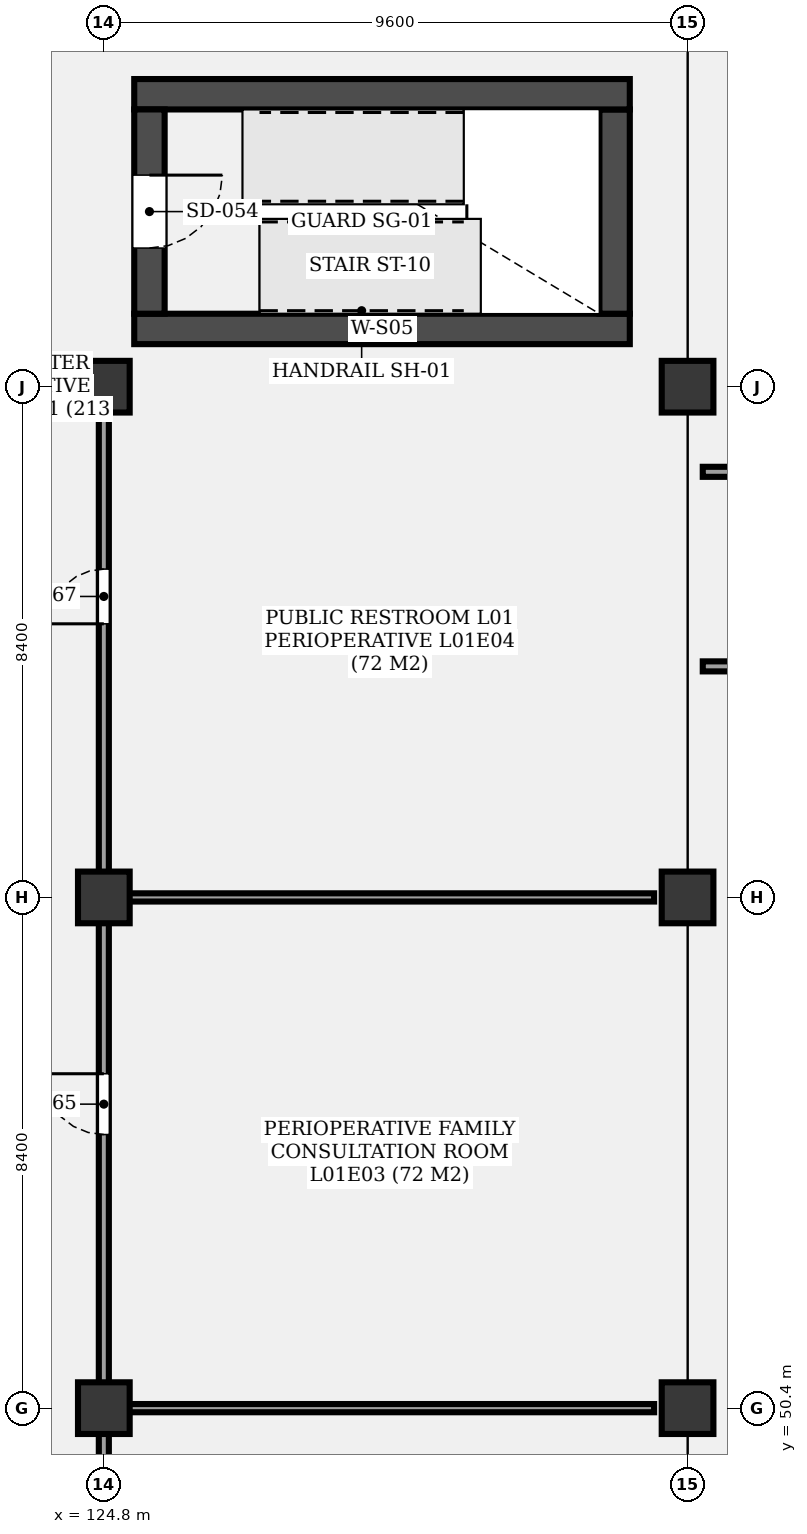
"""IFC4 building model, lengths in metres.
Left out: names, types, materials, properties, quantities, classifications, styles, units other than length and angle.
Written with IfcOpenShell. Run it as: python <this file> out.ifc"""

import sys

from ifc_helpers import new_model, si_unit, direction, frame, frame_2d, origin, origin_2d, place, context, subcontext, project, spatial, rectangle, extrude, element, fill, save


model = new_model("IFC4")
c1 = context("Model", 3, precision=1e-05, world=origin(), true_north=direction((0.0, 1.0)))
c2 = subcontext(c1, "Body", "Model", "MODEL_VIEW")
j1 = project(units=[si_unit("LENGTHUNIT", "METRE"), si_unit("PLANEANGLEUNIT", "RADIAN")], contexts=[c1])
p1 = place(None, origin())
s1 = spatial("IfcSite", under=j1, at=p1, CompositionType="ELEMENT")
p2 = place(p1, origin())
s2 = spatial("IfcBuilding", under=s1, at=p2, CompositionType="ELEMENT")
p3 = place(p2, frame((0.0, 0.0, 5.1)))
s3 = spatial("IfcBuildingStorey", under=s2, at=p3, CompositionType="ELEMENT", Elevation=5.1)
for number, where, z_axis, x_axis in (
    (1, (124.8, 50.4, 0.0), (0.0, 0.0, 1.0), (1.0, 0.0, 0.0)),
    (2, (124.8, 58.8, 0.0), (0.0, 0.0, 1.0), (1.0, 0.0, 0.0)),
    (3, (124.8, 67.2, 0.0), (0.0, 0.0, 1.0), (1.0, 0.0, 0.0)),
    (4, (134.4, 50.4, 0.0), (0.0, 0.0, 1.0), (1.0, 0.0, 0.0)),
    (5, (134.4, 58.8, 0.0), (0.0, 0.0, 1.0), (1.0, 0.0, 0.0)),
    (6, (134.4, 67.2, 0.0), (0.0, 0.0, 1.0), (1.0, 0.0, 0.0)),
):
    element("IfcColumn", number, at=place(p3, frame(where, z_axis=z_axis, x_axis=x_axis)), inside=s3, PredefinedType="COLUMN", context=c2, shape_type="SweptSolid", body=[
        extrude(rectangle(XDim=0.85, YDim=0.85, at=origin_2d()), origin(), (0.0, 0.0, 1.0), 4.8),
    ])
p4 = place(p3, frame((125.3, 68.15, 0.0), z_axis=(0.0, 0.0, 1.0), x_axis=(1.0, 0.0, 0.0)))
e7 = element("IfcWall", 7, at=p4, inside=s3, PredefinedType="SHEAR", context=c2, shape_type="SweptSolid", body=[
    extrude(rectangle(XDim=8.15, YDim=0.5, at=frame_2d((4.075, 0.0))), origin(), (0.0, 0.0, 1.0), 4.8),
])
p5 = place(p3, frame((133.2, 68.4, 0.0), z_axis=(0.0, 0.0, 1.0), x_axis=(0.0, 1.0, 0.0)))
e8 = element("IfcWall", 8, at=p5, inside=s3, PredefinedType="SHEAR", context=c2, shape_type="SweptSolid", body=[
    extrude(rectangle(XDim=3.36, YDim=0.5, at=frame_2d((1.68, 0.0))), origin(), (0.0, 0.0, 1.0), 4.8),
])
p6 = place(p3, frame((133.45, 72.01, 0.0), z_axis=(0.0, 0.0, 1.0), x_axis=(-1.0, 0.0, 0.0)))
e9 = element("IfcWall", 9, at=p6, inside=s3, PredefinedType="SHEAR", context=c2, shape_type="SweptSolid", body=[
    extrude(rectangle(XDim=8.15, YDim=0.5, at=frame_2d((4.075, 0.0))), origin(), (0.0, 0.0, 1.0), 4.8),
])
p7 = place(p3, frame((125.55, 71.76, 0.0), z_axis=(0.0, 0.0, 1.0), x_axis=(0.0, -1.0, 0.0)))
e10 = element("IfcWall", 10, at=p7, inside=s3, PredefinedType="SHEAR", context=c2, shape_type="SweptSolid", body=[
    extrude(rectangle(XDim=3.36, YDim=0.5, at=frame_2d((1.68, 0.0))), origin(), (0.0, 0.0, 1.0), 4.8),
])
p8 = place(p7, frame((1.08, 0.0, 0.0)))
e11 = element("IfcOpeningElement", 11, at=p8, cuts=e10, PredefinedType="OPENING", context=c2, shape_type="SweptSolid", body=[
    extrude(rectangle(XDim=1.2, YDim=2.2, at=frame_2d((0.6, 1.1))), frame((0.0, 0.26, 0.0), z_axis=(0.0, -1.0, 0.0), x_axis=(1.0, 0.0, 0.0)), (0.0, 0.0, 1.0), 0.52),
])
p9 = place(p3, frame((124.8, 42.25, 0.0), z_axis=(0.0, 0.0, 1.0), x_axis=(0.0, 1.0, 0.0)))
e12 = element("IfcWall", 12, at=p9, inside=s3, PredefinedType="PARTITIONING", context=c2, shape_type="SweptSolid", body=[
    extrude(rectangle(XDim=7.9, YDim=0.165, at=frame_2d((3.95, 0.0))), origin(), (0.0, 0.0, 1.0), 3.68),
])
p10 = place(p9, frame((4.25, 0.0, 0.0)))
e13 = element("IfcOpeningElement", 13, at=p10, cuts=e12, PredefinedType="OPENING", context=c2, shape_type="SweptSolid", body=[
    extrude(rectangle(XDim=0.9, YDim=2.1, at=frame_2d((0.45, 1.05))), frame((0.0, 0.093, 0.0), z_axis=(0.0, -1.0, 0.0), x_axis=(1.0, 0.0, 0.0)), (0.0, 0.0, 1.0), 0.185),
])
p11 = place(p3, frame((124.8, 50.65, 0.0), z_axis=(0.0, 0.0, 1.0), x_axis=(0.0, 1.0, 0.0)))
e14 = element("IfcWall", 14, at=p11, inside=s3, PredefinedType="PARTITIONING", context=c2, shape_type="SweptSolid", body=[
    extrude(rectangle(XDim=7.9, YDim=0.165, at=frame_2d((3.95, 0.0))), origin(), (0.0, 0.0, 1.0), 3.68),
])
p12 = place(p11, frame((4.25, 0.0, 0.0)))
e15 = element("IfcOpeningElement", 15, at=p12, cuts=e14, PredefinedType="OPENING", context=c2, shape_type="SweptSolid", body=[
    extrude(rectangle(XDim=1.0, YDim=2.2, at=frame_2d((0.5, 1.1))), frame((0.0, 0.093, 0.0), z_axis=(0.0, -1.0, 0.0), x_axis=(1.0, 0.0, 0.0)), (0.0, 0.0, 1.0), 0.185),
])
p13 = place(p3, frame((124.95, 50.4, 0.0), z_axis=(0.0, 0.0, 1.0), x_axis=(1.0, 0.0, 0.0)))
e16 = element("IfcWall", 16, at=p13, inside=s3, PredefinedType="PARTITIONING", context=c2, shape_type="SweptSolid", body=[
    extrude(rectangle(XDim=8.9, YDim=0.135, at=frame_2d((4.45, 0.0))), origin(), (0.0, 0.0, 1.0), 3.68),
])
p14 = place(p3, frame((124.8, 59.05, 0.0), z_axis=(0.0, 0.0, 1.0), x_axis=(0.0, 1.0, 0.0)))
e17 = element("IfcWall", 17, at=p14, inside=s3, PredefinedType="PARTITIONING", context=c2, shape_type="SweptSolid", body=[
    extrude(rectangle(XDim=7.9, YDim=0.165, at=frame_2d((3.95, 0.0))), origin(), (0.0, 0.0, 1.0), 3.68),
])
p15 = place(p14, frame((4.25, 0.0, 0.0)))
e18 = element("IfcOpeningElement", 18, at=p15, cuts=e17, PredefinedType="OPENING", context=c2, shape_type="SweptSolid", body=[
    extrude(rectangle(XDim=0.9, YDim=2.1, at=frame_2d((0.45, 1.05))), frame((0.0, 0.093, 0.0), z_axis=(0.0, -1.0, 0.0), x_axis=(1.0, 0.0, 0.0)), (0.0, 0.0, 1.0), 0.185),
])
p16 = place(p3, frame((124.95, 58.8, 0.0), z_axis=(0.0, 0.0, 1.0), x_axis=(1.0, 0.0, 0.0)))
e19 = element("IfcWall", 19, at=p16, inside=s3, PredefinedType="PARTITIONING", context=c2, shape_type="SweptSolid", body=[
    extrude(rectangle(XDim=8.9, YDim=0.135, at=frame_2d((4.45, 0.0))), origin(), (0.0, 0.0, 1.0), 3.68),
])
p17 = place(p3, frame((134.65, 62.6, 0.0), z_axis=(0.0, 0.0, 1.0), x_axis=(1.0, 0.0, 0.0)))
e20 = element("IfcWall", 20, at=p17, inside=s3, PredefinedType="PARTITIONING", context=c2, shape_type="SweptSolid", body=[
    extrude(rectangle(XDim=9.633, YDim=0.165, at=frame_2d((4.816, 0.0))), origin(), (0.0, 0.0, 1.0), 3.68),
])
p18 = place(p17, frame((2.65, 0.0, 0.0)))
e21 = element("IfcOpeningElement", 21, at=p18, cuts=e20, PredefinedType="OPENING", context=c2, shape_type="SweptSolid", body=[
    extrude(rectangle(XDim=1.6, YDim=2.2, at=frame_2d((0.8, 1.1))), frame((0.0, 0.093, 0.0), z_axis=(0.0, -1.0, 0.0), x_axis=(1.0, 0.0, 0.0)), (0.0, 0.0, 1.0), 0.185),
])
p19 = place(p3, frame((134.65, 65.8, 0.0), z_axis=(0.0, 0.0, 1.0), x_axis=(1.0, 0.0, 0.0)))
e22 = element("IfcWall", 22, at=p19, inside=s3, PredefinedType="PARTITIONING", context=c2, shape_type="SweptSolid", body=[
    extrude(rectangle(XDim=9.633, YDim=0.165, at=frame_2d((4.816, 0.0))), origin(), (0.0, 0.0, 1.0), 3.68),
])
p20 = place(p19, frame((4.75, 0.0, 0.0)))
e23 = element("IfcOpeningElement", 23, at=p20, cuts=e22, PredefinedType="OPENING", context=c2, shape_type="SweptSolid", body=[
    extrude(rectangle(XDim=1.05, YDim=2.1, at=frame_2d((0.525, 1.05))), frame((0.0, 0.093, 0.0), z_axis=(0.0, -1.0, 0.0), x_axis=(1.0, 0.0, 0.0)), (0.0, 0.0, 1.0), 0.185),
])
p21 = place(p8, origin())
e24 = element("IfcDoor", 24, at=p21, inside=s3, OperationType="SINGLE_SWING_LEFT", PredefinedType="DOOR", context=c2, shape_type="SweptSolid", body=[
    extrude(rectangle(XDim=1.2, YDim=2.2, at=frame_2d((0.6, 1.1))), frame((0.0, 0.025, 0.0), z_axis=(0.0, -1.0, 0.0), x_axis=(1.0, 0.0, 0.0)), (0.0, 0.0, 1.0), 0.05),
])
fill(e11, e24)
p22 = place(p12, origin())
e25 = element("IfcDoor", 25, at=p22, inside=s3, OperationType="SINGLE_SWING_RIGHT", PredefinedType="DOOR", context=c2, shape_type="SweptSolid", body=[
    extrude(rectangle(XDim=1.0, YDim=2.2, at=frame_2d((0.5, 1.1))), frame((0.0, 0.025, 0.0), z_axis=(0.0, -1.0, 0.0), x_axis=(1.0, 0.0, 0.0)), (0.0, 0.0, 1.0), 0.05),
])
fill(e15, e25)
p23 = place(p15, origin())
e26 = element("IfcDoor", 26, at=p23, inside=s3, OperationType="SINGLE_SWING_LEFT", PredefinedType="DOOR", context=c2, shape_type="SweptSolid", body=[
    extrude(rectangle(XDim=0.9, YDim=2.1, at=frame_2d((0.45, 1.05))), frame((0.0, 0.025, 0.0), z_axis=(0.0, -1.0, 0.0), x_axis=(1.0, 0.0, 0.0)), (0.0, 0.0, 1.0), 0.05),
])
fill(e18, e26)
save(model, sys.argv[1])
